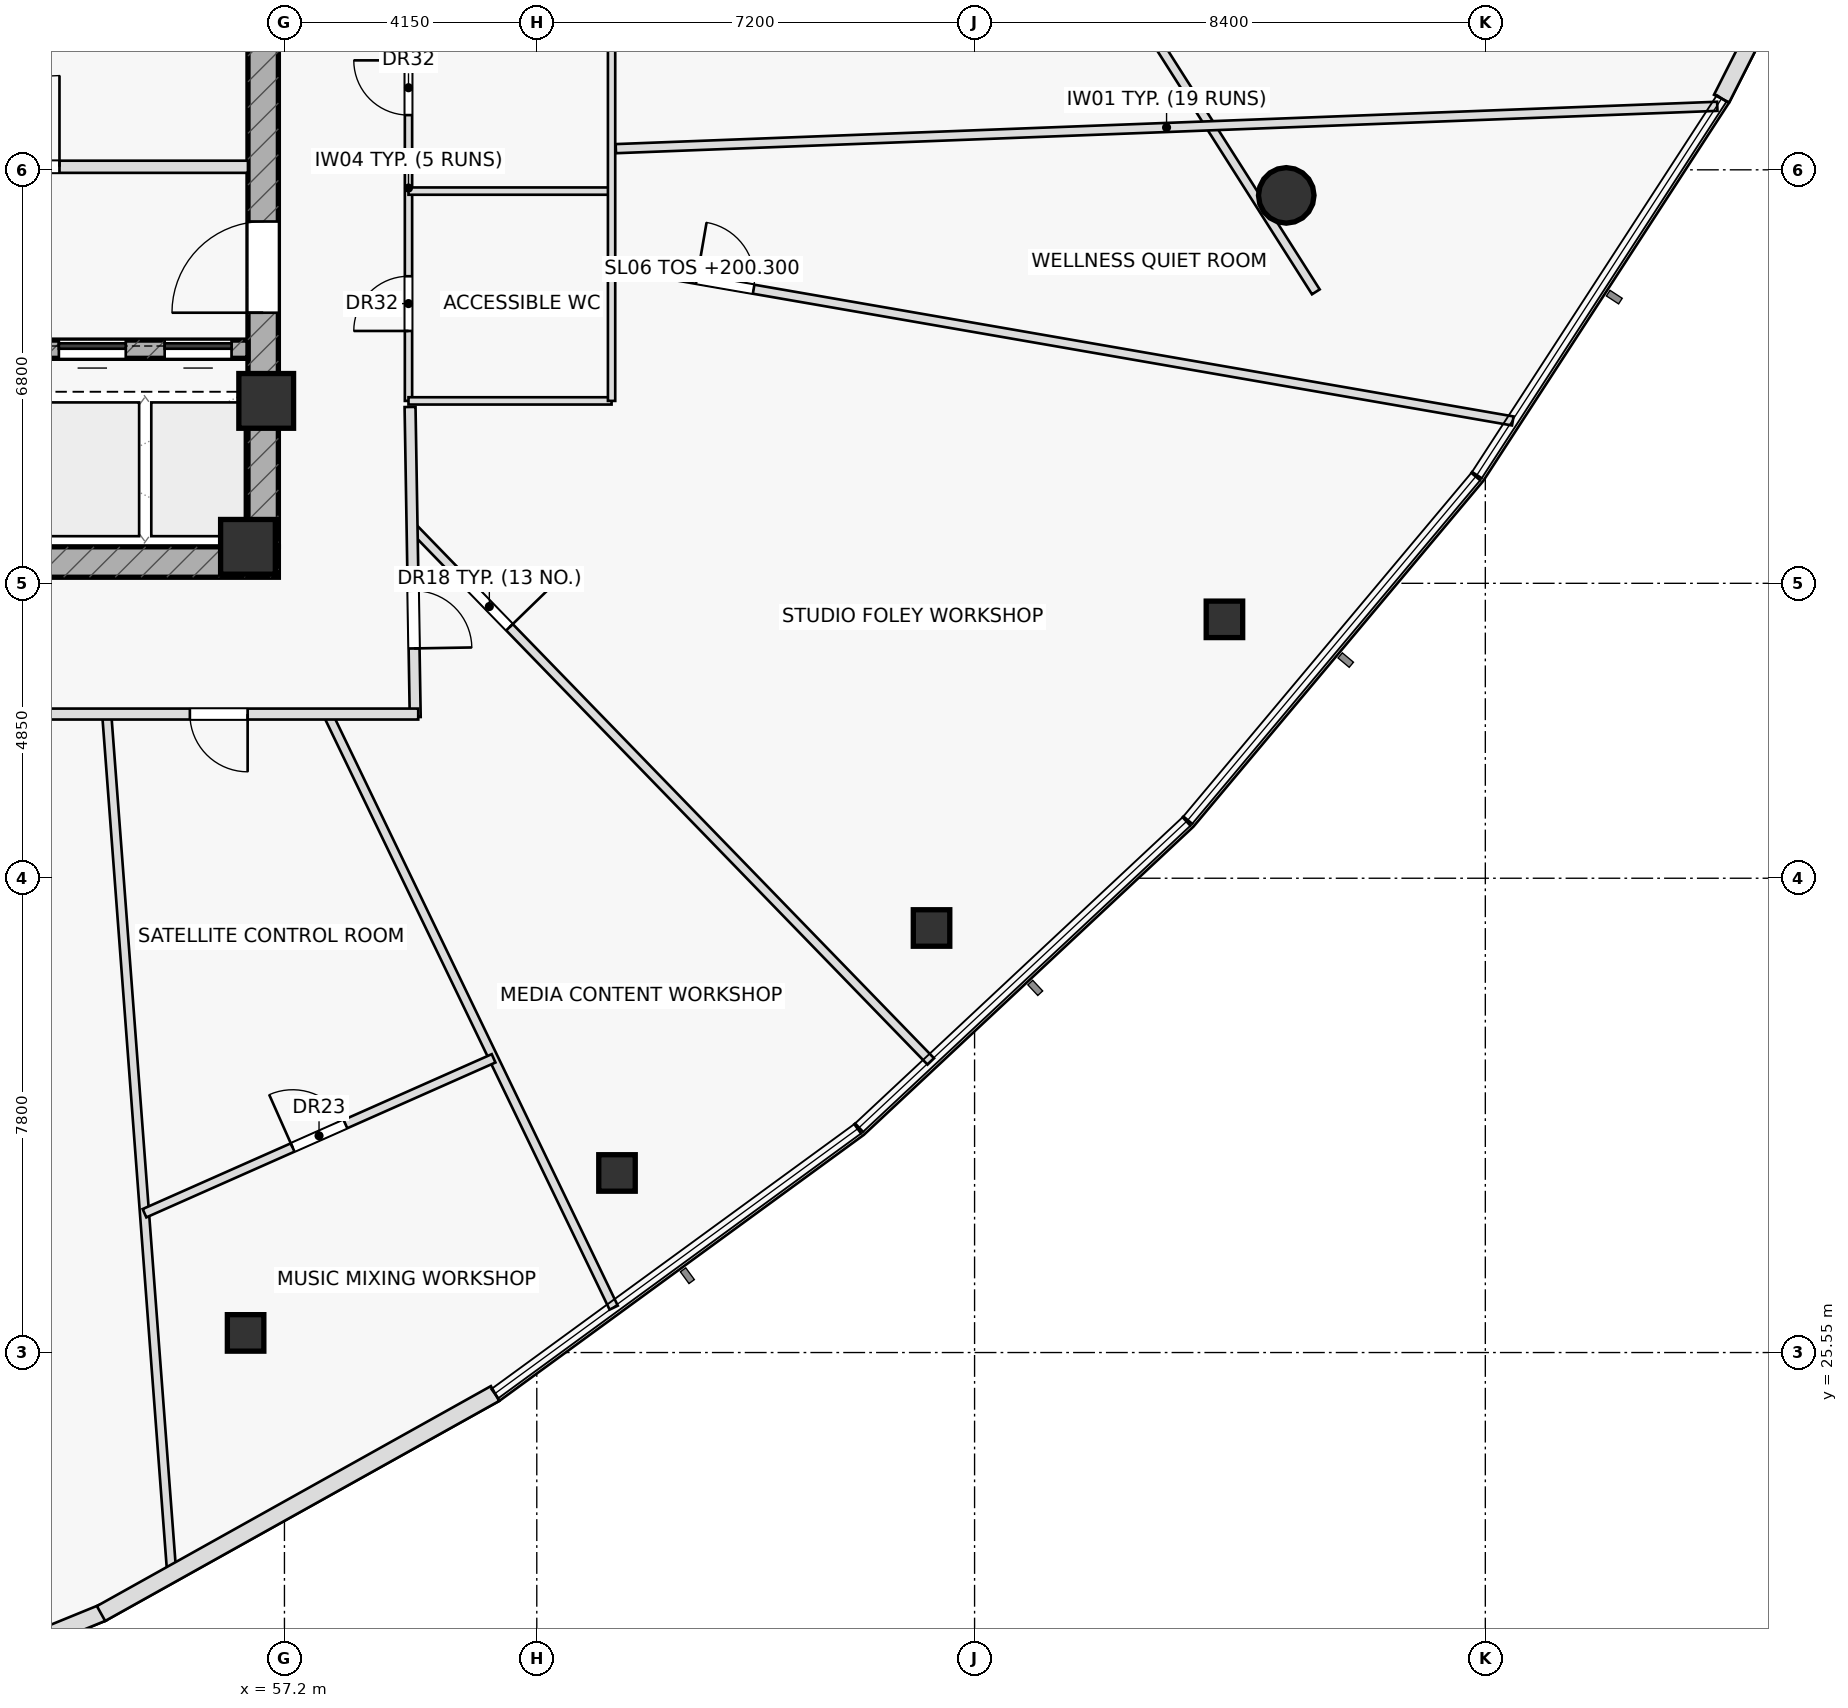
"""IFC4 building model, lengths in metres.
Left out: names, types, materials, properties, quantities, classifications, styles, units other than length and angle.
Written with IfcOpenShell. Run it as: python <this file> out.ifc"""

import sys

from ifc_helpers import new_model, si_unit, direction, frame, frame_2d, origin, origin_2d, place, context, subcontext, project, spatial, rectangle, hollow_rectangle, hollow_circle, extrude, element, fill, save


model = new_model("IFC4")
c1 = context("Model", 3, precision=1e-05, world=origin(), true_north=direction((0.0, 1.0)))
c2 = subcontext(c1, "Body", "Model", "MODEL_VIEW")
j1 = project(units=[si_unit("LENGTHUNIT", "METRE"), si_unit("PLANEANGLEUNIT", "RADIAN")], contexts=[c1])
p1 = place(None, origin())
s1 = spatial("IfcSite", under=j1, at=p1, CompositionType="ELEMENT")
p2 = place(p1, origin())
s2 = spatial("IfcBuilding", under=s1, at=p2, CompositionType="ELEMENT")
p3 = place(p2, frame((0.0, 0.0, 200.3)))
s3 = spatial("IfcBuildingStorey", under=s2, at=p3, CompositionType="ELEMENT", Elevation=200.3)
p4 = place(p3, frame((42.9, 38.55, 0.0), z_axis=(0.0, 0.0, 1.0), x_axis=(1.0, 0.0, 0.0)))
e1 = element("IfcWall", 1, at=p4, inside=s3, PredefinedType="SHEAR", context=c2, shape_type="SweptSolid", body=[
    extrude(rectangle(XDim=14.2, YDim=0.5, at=frame_2d((7.1, 0.0))), origin(), (0.0, 0.0, 1.0), 3.55),
])
p5 = place(p4, frame((0.78, 0.0, 0.0)))
e2 = element("IfcOpeningElement", 2, at=p5, cuts=e1, PredefinedType="OPENING", context=c2, shape_type="SweptSolid", body=[
    extrude(rectangle(XDim=1.05, YDim=2.2, at=frame_2d((0.525, 1.1))), frame((0.0, 0.26, 0.0), z_axis=(0.0, -1.0, 0.0), x_axis=(1.0, 0.0, 0.0)), (0.0, 0.0, 1.0), 0.52),
])
p6 = place(p3, frame((56.85, 38.8, 0.0), z_axis=(0.0, 0.0, 1.0), x_axis=(0.0, 1.0, 0.0)))
e3 = element("IfcWall", 3, at=p6, inside=s3, PredefinedType="SHEAR", context=c2, shape_type="SweptSolid", body=[
    extrude(rectangle(XDim=12.4, YDim=0.5, at=frame_2d((6.2, 0.0))), origin(), (0.0, 0.0, 1.0), 3.55),
])
p7 = place(p6, frame((3.85, 0.0, 0.0)))
e4 = element("IfcOpeningElement", 4, at=p7, cuts=e3, PredefinedType="OPENING", context=c2, shape_type="SweptSolid", body=[
    extrude(rectangle(XDim=1.5, YDim=2.2, at=frame_2d((0.75, 1.1))), frame((0.0, 0.26, 0.0), z_axis=(0.0, -1.0, 0.0), x_axis=(1.0, 0.0, 0.0)), (0.0, 0.0, 1.0), 0.52),
])
p8 = place(p3, frame((43.4, 42.05, 0.0), z_axis=(0.0, 0.0, 1.0), x_axis=(1.0, 0.0, 0.0)))
e5 = element("IfcWall", 5, at=p8, inside=s3, PredefinedType="SHEAR", context=c2, shape_type="SweptSolid", body=[
    extrude(rectangle(XDim=13.2, YDim=0.3, at=frame_2d((6.6, 0.0))), origin(), (0.0, 0.0, 1.0), 3.55),
])
p9 = place(p8, frame((8.37, 0.0, 0.0)))
e6 = element("IfcOpeningElement", 6, at=p9, cuts=e5, PredefinedType="OPENING", context=c2, shape_type="SweptSolid", body=[
    extrude(rectangle(XDim=1.1, YDim=2.15, at=frame_2d((0.55, 1.075))), frame((0.0, 0.16, 0.0), z_axis=(0.0, -1.0, 0.0), x_axis=(1.0, 0.0, 0.0)), (0.0, 0.0, 1.0), 0.32),
])
p10 = place(p8, frame((10.09, 0.0, 0.0)))
e7 = element("IfcOpeningElement", 7, at=p10, cuts=e5, PredefinedType="OPENING", context=c2, shape_type="SweptSolid", body=[
    extrude(rectangle(XDim=1.1, YDim=2.15, at=frame_2d((0.55, 1.075))), frame((0.0, 0.16, 0.0), z_axis=(0.0, -1.0, 0.0), x_axis=(1.0, 0.0, 0.0)), (0.0, 0.0, 1.0), 0.32),
])
p11 = place(p8, frame((11.83, 0.0, 0.0)))
e8 = element("IfcOpeningElement", 8, at=p11, cuts=e5, PredefinedType="OPENING", context=c2, shape_type="SweptSolid", body=[
    extrude(rectangle(XDim=1.1, YDim=2.15, at=frame_2d((0.55, 1.075))), frame((0.0, 0.16, 0.0), z_axis=(0.0, -1.0, 0.0), x_axis=(1.0, 0.0, 0.0)), (0.0, 0.0, 1.0), 0.32),
])
for number, where, z_axis, x_axis in (
    (9, (56.9, 41.2, 0.0), (0.0, 0.0, 1.0), (1.0, 0.0, 0.0)),
    (10, (56.6, 38.8, 0.0), (0.0, 0.0, 1.0), (1.0, 0.0, 0.0)),
):
    element("IfcColumn", number, at=place(p3, frame(where, z_axis=z_axis, x_axis=x_axis)), inside=s3, PredefinedType="COLUMN", context=c2, shape_type="SweptSolid", body=[
        extrude(rectangle(XDim=0.9, YDim=0.9, at=origin_2d()), origin(), (0.0, 0.0, 1.0), 3.55),
    ])
for number, where, z_axis, x_axis in (
    (11, (56.561, 25.873, 0.0), (0.0, 0.0, 1.0), (1.0, 0.0, 0.0)),
    (12, (62.669, 28.503, 0.0), (0.0, 0.0, 1.0), (1.0, 0.0, 0.0)),
    (13, (67.842, 32.532, 0.0), (0.0, 0.0, 1.0), (1.0, 0.0, 0.0)),
    (14, (72.659, 37.607, 0.0), (0.0, 0.0, 1.0), (1.0, 0.0, 0.0)),
):
    element("IfcColumn", number, at=place(p3, frame(where, z_axis=z_axis, x_axis=x_axis)), inside=s3, PredefinedType="COLUMN", context=c2, shape_type="SweptSolid", body=[
        extrude(hollow_rectangle(XDim=0.6, YDim=0.6, WallThickness=0.036, at=origin_2d()), origin(), (0.0, 0.0, 1.0), 3.55),
    ])
p12 = place(p3, frame((73.676, 44.58, 0.0), z_axis=(0.0, 0.0, 1.0), x_axis=(1.0, 0.0, 0.0)))
e15 = element("IfcColumn", 15, at=p12, inside=s3, PredefinedType="COLUMN", context=c2, shape_type="SweptSolid", body=[
    extrude(hollow_circle(Radius=0.457, WallThickness=0.04, at=origin_2d()), origin(), (0.0, 0.0, 1.0), 3.55),
])
p13 = place(p3, frame((50.65, 45.05, 0.0), z_axis=(0.0, 0.0, 1.0), x_axis=(1.0, 0.0, 0.0)))
e16 = element("IfcWall", 16, at=p13, inside=s3, PredefinedType="PARTITIONING", context=c2, shape_type="SweptSolid", body=[
    extrude(rectangle(XDim=5.95, YDim=0.2, at=frame_2d((2.975, 0.0))), origin(), (0.0, 0.0, 1.0), 3.55),
])
p14 = place(p13, frame((1.35, 0.0, 0.0)))
e17 = element("IfcOpeningElement", 17, at=p14, cuts=e16, PredefinedType="OPENING", context=c2, shape_type="SweptSolid", body=[
    extrude(rectangle(XDim=1.5, YDim=2.2, at=frame_2d((0.75, 1.1))), frame((0.0, 0.11, 0.0), z_axis=(0.0, -1.0, 0.0), x_axis=(1.0, 0.0, 0.0)), (0.0, 0.0, 1.0), 0.22),
])
p15 = place(p3, frame((74.163, 42.993, 0.0), z_axis=(0.0, 0.0, 1.0), x_axis=(-0.53628142437, 0.844039237166, 0.0)))
e18 = element("IfcWall", 18, at=p15, inside=s3, PredefinedType="PARTITIONING", context=c2, shape_type="SweptSolid", body=[
    extrude(rectangle(XDim=10.267, YDim=0.15, at=frame_2d((5.133, 0.0))), origin(), (0.0, 0.0, 1.0), 2.935),
])
p16 = place(p3, frame((59.24, 41.2, 0.0), z_axis=(0.0, 0.0, 1.0), x_axis=(0.0, 1.0, 0.0)))
e19 = element("IfcWall", 19, at=p16, inside=s3, PredefinedType="PARTITIONING", context=c2, shape_type="SweptSolid", body=[
    extrude(rectangle(XDim=7.0, YDim=0.12, at=frame_2d((3.5, 0.0))), origin(), (0.0, 0.0, 1.0), 3.55),
])
p17 = place(p16, frame((1.15, 0.0, 0.0)))
e20 = element("IfcOpeningElement", 20, at=p17, cuts=e19, PredefinedType="OPENING", context=c2, shape_type="SweptSolid", body=[
    extrude(rectangle(XDim=0.9, YDim=2.05, at=frame_2d((0.45, 1.025))), frame((0.0, 0.07, 0.0), z_axis=(0.0, -1.0, 0.0), x_axis=(1.0, 0.0, 0.0)), (0.0, 0.0, 1.0), 0.14),
])
p18 = place(p16, frame((4.7, 0.0, 0.0)))
e21 = element("IfcOpeningElement", 21, at=p18, cuts=e19, PredefinedType="OPENING", context=c2, shape_type="SweptSolid", body=[
    extrude(rectangle(XDim=0.9, YDim=2.05, at=frame_2d((0.45, 1.025))), frame((0.0, 0.07, 0.0), z_axis=(0.0, -1.0, 0.0), x_axis=(1.0, 0.0, 0.0)), (0.0, 0.0, 1.0), 0.14),
])
for number, where, z_axis, x_axis in (
    (22, (59.24, 41.2, 0.0), (0.0, 0.0, 1.0), (1.0, 0.0, 0.0)),
    (23, (59.24, 44.65, 0.0), (0.0, 0.0, 1.0), (1.0, 0.0, 0.0)),
):
    element("IfcWall", number, at=place(p3, frame(where, z_axis=z_axis, x_axis=x_axis)), inside=s3, PredefinedType="PARTITIONING", context=c2, shape_type="SweptSolid", body=[
        extrude(rectangle(XDim=3.34, YDim=0.12, at=frame_2d((1.67, 0.0))), origin(), (0.0, 0.0, 1.0), 3.55),
    ])
p19 = place(p3, frame((62.58, 41.2, 0.0), z_axis=(0.0, 0.0, 1.0), x_axis=(0.0, 1.0, 0.0)))
e24 = element("IfcWall", 24, at=p19, inside=s3, PredefinedType="PARTITIONING", context=c2, shape_type="SweptSolid", body=[
    extrude(rectangle(XDim=7.0, YDim=0.12, at=frame_2d((3.5, 0.0))), origin(), (0.0, 0.0, 1.0), 3.55),
])
p20 = place(p3, frame((54.277, 36.05, 0.0), z_axis=(0.0, 0.0, 1.0), x_axis=(0.075441607512, -0.997150221309, 0.0)))
e25 = element("IfcWall", 25, at=p20, inside=s3, PredefinedType="PARTITIONING", context=c2, shape_type="SweptSolid", body=[
    extrude(rectangle(XDim=14.194, YDim=0.15, at=frame_2d((7.097, 0.0))), origin(), (0.0, 0.0, 1.0), 3.025),
])
p21 = place(p3, frame((57.912, 36.05, 0.0), z_axis=(0.0, 0.0, 1.0), x_axis=(0.434024939568, -0.900900855718, 0.0)))
e26 = element("IfcWall", 26, at=p21, inside=s3, PredefinedType="PARTITIONING", context=c2, shape_type="SweptSolid", body=[
    extrude(rectangle(XDim=10.835, YDim=0.15, at=frame_2d((5.418, 0.0))), origin(), (0.0, 0.0, 1.0), 3.025),
])
p22 = place(p3, frame((59.299, 39.128, 0.0), z_axis=(0.0, 0.0, 1.0), x_axis=(0.696454852061, -0.717600612486, 0.0)))
e27 = element("IfcWall", 27, at=p22, inside=s3, PredefinedType="PARTITIONING", context=c2, shape_type="SweptSolid", body=[
    extrude(rectangle(XDim=12.25, YDim=0.15, at=frame_2d((6.125, 0.0))), origin(), (0.0, 0.0, 1.0), 2.935),
])
p23 = place(p22, frame((1.35, 0.0, 0.0)))
e28 = element("IfcOpeningElement", 28, at=p23, cuts=e27, PredefinedType="OPENING", context=c2, shape_type="SweptSolid", body=[
    extrude(rectangle(XDim=0.95, YDim=2.05, at=frame_2d((0.475, 1.025))), frame((0.0, 0.085, 0.0), z_axis=(0.0, -1.0, 0.0), x_axis=(1.0, 0.0, 0.0)), (0.0, 0.0, 1.0), 0.17),
])
p24 = place(p3, frame((62.65, 43.43, 0.0), z_axis=(0.0, 0.0, 1.0), x_axis=(0.985278700053, -0.170955793181, 0.0)))
e29 = element("IfcWall", 29, at=p24, inside=s3, PredefinedType="PARTITIONING", context=c2, shape_type="SweptSolid", body=[
    extrude(rectangle(XDim=14.972, YDim=0.15, at=frame_2d((7.486, 0.0))), origin(), (0.0, 0.0, 1.0), 2.935),
])
p25 = place(p24, frame((1.35, 0.0, 0.0)))
e30 = element("IfcOpeningElement", 30, at=p25, cuts=e29, PredefinedType="OPENING", context=c2, shape_type="SweptSolid", body=[
    extrude(rectangle(XDim=0.95, YDim=2.05, at=frame_2d((0.475, 1.025))), frame((0.0, 0.085, 0.0), z_axis=(0.0, -1.0, 0.0), x_axis=(1.0, 0.0, 0.0)), (0.0, 0.0, 1.0), 0.17),
])
p26 = place(p3, frame((62.65, 45.348, 0.0), z_axis=(0.0, 0.0, 1.0), x_axis=(0.99926109506, 0.038435190907, 0.0)))
e31 = element("IfcWall", 31, at=p26, inside=s3, PredefinedType="PARTITIONING", context=c2, shape_type="SweptSolid", body=[
    extrude(rectangle(XDim=18.129, YDim=0.15, at=frame_2d((9.064, 0.0))), origin(), (0.0, 0.0, 1.0), 3.025),
])
p27 = place(p3, frame((54.898, 27.841, 0.0), z_axis=(0.0, 0.0, 1.0), x_axis=(0.91408542803, 0.405521676687, 0.0)))
e32 = element("IfcWall", 32, at=p27, inside=s3, PredefinedType="PARTITIONING", context=c2, shape_type="SweptSolid", body=[
    extrude(rectangle(XDim=6.281, YDim=0.15, at=frame_2d((3.141, 0.0))), origin(), (0.0, 0.0, 1.0), 2.935),
])
p28 = place(p27, frame((2.666, 0.0, 0.0)))
e33 = element("IfcOpeningElement", 33, at=p28, cuts=e32, PredefinedType="OPENING", context=c2, shape_type="SweptSolid", body=[
    extrude(rectangle(XDim=0.95, YDim=2.05, at=frame_2d((0.475, 1.025))), frame((0.0, 0.085, 0.0), z_axis=(0.0, -1.0, 0.0), x_axis=(1.0, 0.0, 0.0)), (0.0, 0.0, 1.0), 0.17),
])
p29 = place(p3, frame((59.266, 41.1, 0.0), z_axis=(0.0, 0.0, 1.0), x_axis=(0.016656377357, -0.999861272924, 0.0)))
e34 = element("IfcWall", 34, at=p29, inside=s3, PredefinedType="PARTITIONING", context=c2, shape_type="SweptSolid", body=[
    extrude(rectangle(XDim=5.101, YDim=0.18, at=frame_2d((2.55, 0.0))), origin(), (0.0, 0.0, 1.0), 2.935),
])
p30 = place(p29, frame((3.021, 0.0, 0.0)))
e35 = element("IfcOpeningElement", 35, at=p30, cuts=e34, PredefinedType="OPENING", context=c2, shape_type="SweptSolid", body=[
    extrude(rectangle(XDim=0.95, YDim=2.05, at=frame_2d((0.475, 1.025))), frame((0.0, 0.1, 0.0), z_axis=(0.0, -1.0, 0.0), x_axis=(1.0, 0.0, 0.0)), (0.0, 0.0, 1.0), 0.2),
])
p31 = place(p3, frame((59.4, 36.05, 0.0), z_axis=(0.0, 0.0, 1.0), x_axis=(-1.0, 0.0, 0.0)))
e36 = element("IfcWall", 36, at=p31, inside=s3, PredefinedType="PARTITIONING", context=c2, shape_type="SweptSolid", body=[
    extrude(rectangle(XDim=19.65, YDim=0.18, at=frame_2d((9.825, 0.0))), origin(), (0.0, 0.0, 1.0), 2.935),
])
p32 = place(p31, frame((2.805, 0.0, 0.0)))
e37 = element("IfcOpeningElement", 37, at=p32, cuts=e36, PredefinedType="OPENING", context=c2, shape_type="SweptSolid", body=[
    extrude(rectangle(XDim=0.95, YDim=2.05, at=frame_2d((0.475, 1.025))), frame((0.0, 0.1, 0.0), z_axis=(0.0, -1.0, 0.0), x_axis=(1.0, 0.0, 0.0)), (0.0, 0.0, 1.0), 0.2),
])
p33 = place(p31, frame((11.261, 0.0, 0.0)))
e38 = element("IfcOpeningElement", 38, at=p33, cuts=e36, PredefinedType="OPENING", context=c2, shape_type="SweptSolid", body=[
    extrude(rectangle(XDim=0.95, YDim=2.05, at=frame_2d((0.475, 1.025))), frame((0.0, 0.1, 0.0), z_axis=(0.0, -1.0, 0.0), x_axis=(1.0, 0.0, 0.0)), (0.0, 0.0, 1.0), 0.2),
])
p34 = place(p3, frame((47.329, 18.459, 0.0), z_axis=(0.0, 0.0, 1.0), x_axis=(0.925715323492, 0.378221019844, 0.0)))
e39 = element("IfcWall", 39, at=p34, inside=s3, PredefinedType="STANDARD", context=c2, shape_type="SweptSolid", body=[
    extrude(rectangle(XDim=7.434, YDim=0.28, at=frame_2d((3.717, 0.0))), origin(), (0.0, 0.0, 1.0), 3.55),
])
p35 = place(p3, frame((54.183, 21.258, 0.0), z_axis=(0.0, 0.0, 1.0), x_axis=(0.873143651133, 0.487462987811, 0.0)))
e40 = element("IfcWall", 40, at=p35, inside=s3, PredefinedType="STANDARD", context=c2, shape_type="SweptSolid", body=[
    extrude(rectangle(XDim=7.421, YDim=0.28, at=frame_2d((3.711, 0.0))), origin(), (0.0, 0.0, 1.0), 3.55),
])
p36 = place(p3, frame((80.836, 46.171, 0.0), z_axis=(0.0, 0.0, 1.0), x_axis=(0.451709854095, 0.892164899396, 0.0)))
e41 = element("IfcWall", 41, at=p36, inside=s3, PredefinedType="STANDARD", context=c2, shape_type="SweptSolid", body=[
    extrude(rectangle(XDim=1.931, YDim=0.28, at=frame_2d((0.965, 0.0))), origin(), (0.0, 0.0, 1.0), 3.55),
])
p37 = place(p7, origin())
e42 = element("IfcDoor", 42, at=p37, inside=s3, OperationType="SINGLE_SWING_LEFT", PredefinedType="DOOR", context=c2, shape_type="SweptSolid", body=[
    extrude(rectangle(XDim=1.5, YDim=2.2, at=frame_2d((0.75, 1.1))), frame((0.0, 0.025, 0.0), z_axis=(0.0, -1.0, 0.0), x_axis=(1.0, 0.0, 0.0)), (0.0, 0.0, 1.0), 0.05),
])
fill(e4, e42)
p38 = place(p14, origin())
e43 = element("IfcDoor", 43, at=p38, inside=s3, OperationType="SINGLE_SWING_RIGHT", PredefinedType="DOOR", context=c2, shape_type="SweptSolid", body=[
    extrude(rectangle(XDim=1.5, YDim=2.2, at=frame_2d((0.75, 1.1))), frame((0.0, 0.025, 0.0), z_axis=(0.0, -1.0, 0.0), x_axis=(1.0, 0.0, 0.0)), (0.0, 0.0, 1.0), 0.05),
])
fill(e17, e43)
p39 = place(p17, origin())
e44 = element("IfcDoor", 44, at=p39, inside=s3, OperationType="SINGLE_SWING_LEFT", PredefinedType="DOOR", context=c2, shape_type="SweptSolid", body=[
    extrude(rectangle(XDim=0.9, YDim=2.05, at=frame_2d((0.45, 1.025))), frame((0.0, 0.025, 0.0), z_axis=(0.0, -1.0, 0.0), x_axis=(1.0, 0.0, 0.0)), (0.0, 0.0, 1.0), 0.05),
])
fill(e20, e44)
p40 = place(p18, origin())
e45 = element("IfcDoor", 45, at=p40, inside=s3, OperationType="SINGLE_SWING_RIGHT", PredefinedType="DOOR", context=c2, shape_type="SweptSolid", body=[
    extrude(rectangle(XDim=0.9, YDim=2.05, at=frame_2d((0.45, 1.025))), frame((0.0, 0.025, 0.0), z_axis=(0.0, -1.0, 0.0), x_axis=(1.0, 0.0, 0.0)), (0.0, 0.0, 1.0), 0.05),
])
fill(e21, e45)
p41 = place(p23, origin())
e46 = element("IfcDoor", 46, at=p41, inside=s3, OperationType="SINGLE_SWING_RIGHT", PredefinedType="DOOR", context=c2, shape_type="SweptSolid", body=[
    extrude(rectangle(XDim=0.95, YDim=2.05, at=frame_2d((0.475, 1.025))), frame((0.0, 0.025, 0.0), z_axis=(0.0, -1.0, 0.0), x_axis=(1.0, 0.0, 0.0)), (0.0, 0.0, 1.0), 0.05),
])
fill(e28, e46)
p42 = place(p25, origin())
e47 = element("IfcDoor", 47, at=p42, inside=s3, OperationType="SINGLE_SWING_LEFT", PredefinedType="DOOR", context=c2, shape_type="SweptSolid", body=[
    extrude(rectangle(XDim=0.95, YDim=2.05, at=frame_2d((0.475, 1.025))), frame((0.0, 0.025, 0.0), z_axis=(0.0, -1.0, 0.0), x_axis=(1.0, 0.0, 0.0)), (0.0, 0.0, 1.0), 0.05),
])
fill(e30, e47)
p43 = place(p28, origin())
e48 = element("IfcDoor", 48, at=p43, inside=s3, OperationType="SINGLE_SWING_LEFT", PredefinedType="DOOR", context=c2, shape_type="SweptSolid", body=[
    extrude(rectangle(XDim=0.95, YDim=2.05, at=frame_2d((0.475, 1.025))), frame((0.0, 0.025, 0.0), z_axis=(0.0, -1.0, 0.0), x_axis=(1.0, 0.0, 0.0)), (0.0, 0.0, 1.0), 0.05),
])
fill(e33, e48)
p44 = place(p30, origin())
e49 = element("IfcDoor", 49, at=p44, inside=s3, OperationType="SINGLE_SWING_RIGHT", PredefinedType="DOOR", context=c2, shape_type="SweptSolid", body=[
    extrude(rectangle(XDim=0.95, YDim=2.05, at=frame_2d((0.475, 1.025))), frame((0.0, 0.025, 0.0), z_axis=(0.0, -1.0, 0.0), x_axis=(1.0, 0.0, 0.0)), (0.0, 0.0, 1.0), 0.05),
])
fill(e35, e49)
p45 = place(p32, origin())
e50 = element("IfcDoor", 50, at=p45, inside=s3, OperationType="SINGLE_SWING_LEFT", PredefinedType="DOOR", context=c2, shape_type="SweptSolid", body=[
    extrude(rectangle(XDim=0.95, YDim=2.05, at=frame_2d((0.475, 1.025))), frame((0.0, 0.025, 0.0), z_axis=(0.0, -1.0, 0.0), x_axis=(1.0, 0.0, 0.0)), (0.0, 0.0, 1.0), 0.05),
])
fill(e37, e50)
p46 = place(p10, origin())
e51 = element("IfcDoor", 51, at=p46, inside=s3, OperationType="SLIDING_TO_LEFT", PredefinedType="DOOR", context=c2, shape_type="SweptSolid", body=[
    extrude(rectangle(XDim=1.1, YDim=2.15, at=frame_2d((0.55, 1.075))), frame((0.0, 0.025, 0.0), z_axis=(0.0, -1.0, 0.0), x_axis=(1.0, 0.0, 0.0)), (0.0, 0.0, 1.0), 0.05),
])
fill(e7, e51)
p47 = place(p11, origin())
e52 = element("IfcDoor", 52, at=p47, inside=s3, OperationType="SLIDING_TO_LEFT", PredefinedType="DOOR", context=c2, shape_type="SweptSolid", body=[
    extrude(rectangle(XDim=1.1, YDim=2.15, at=frame_2d((0.55, 1.075))), frame((0.0, 0.025, 0.0), z_axis=(0.0, -1.0, 0.0), x_axis=(1.0, 0.0, 0.0)), (0.0, 0.0, 1.0), 0.05),
])
fill(e8, e52)
save(model, sys.argv[1])
